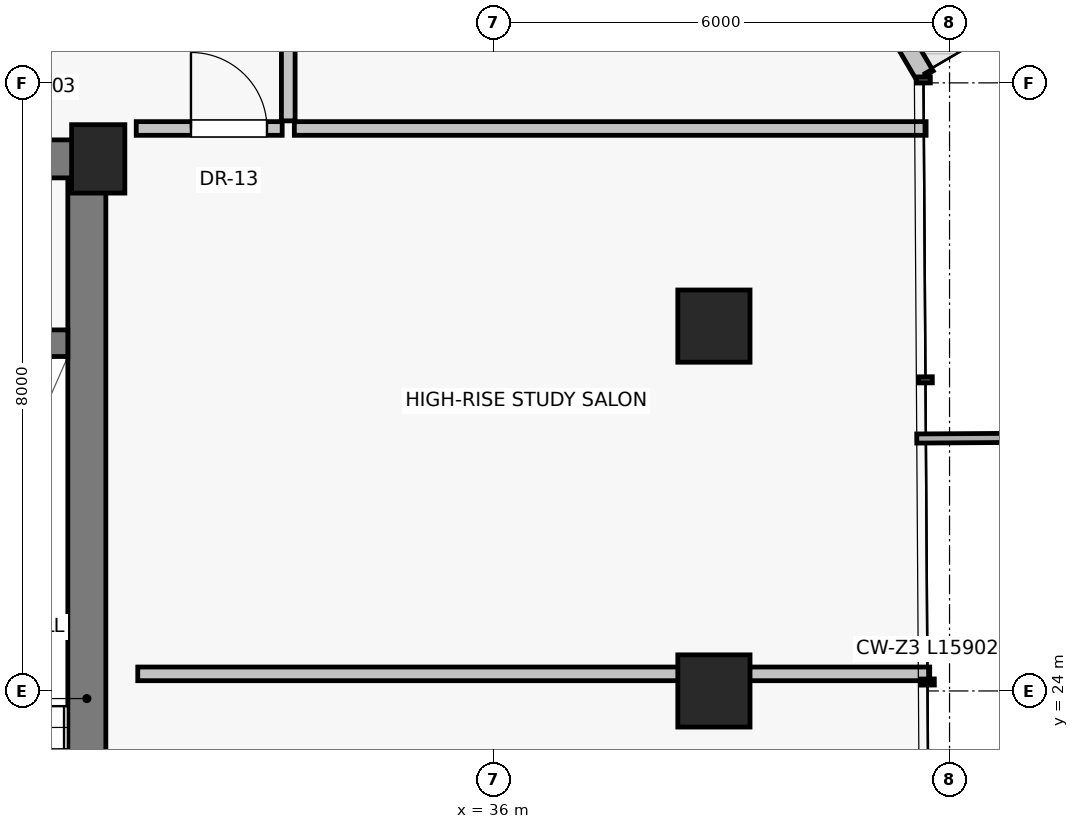
"""IFC4 building model, lengths in metres.
Left out: names, types, materials, properties, quantities, classifications, styles, units other than length and angle.
Written with IfcOpenShell. Run it as: python <this file> out.ifc"""

import sys

from ifc_helpers import new_model, si_unit, direction, frame, frame_2d, origin, origin_2d, place, context, subcontext, project, spatial, rectangle, extrude, source, transform, mapped, element, fill, save


model = new_model("IFC4")
c1 = context("Model", 3, precision=1e-05, world=origin(), true_north=direction((0.0, 1.0)))
c2 = subcontext(c1, "Body", "Model", "MODEL_VIEW")
j1 = project(units=[si_unit("LENGTHUNIT", "METRE"), si_unit("PLANEANGLEUNIT", "RADIAN")], contexts=[c1])
p1 = place(None, origin())
s1 = spatial("IfcSite", under=j1, at=p1, CompositionType="ELEMENT")
p2 = place(p1, origin())
s2 = spatial("IfcBuilding", under=s1, at=p2, CompositionType="ELEMENT")
p3 = place(p2, frame((0.0, 0.0, 204.85)))
s3 = spatial("IfcBuildingStorey", under=s2, at=p3, CompositionType="ELEMENT", Elevation=204.85)
p4 = place(p3, frame((30.8, 31.0, 0.0), z_axis=(0.0, 0.0, 1.0), x_axis=(1.0, 0.0, 0.0)))
e1 = element("IfcColumn", 1, at=p4, inside=s3, PredefinedType="PILASTER", context=c2, shape_type="SweptSolid", body=[
    extrude(rectangle(XDim=0.7, YDim=0.9, at=origin_2d()), origin(), (0.0, 0.0, 1.0), 3.25),
])
for number, where, z_axis, x_axis in (
    (2, (38.9, 24.0, 0.0), (0.0, 0.0, 1.0), (1.0, 0.0, 0.0)),
    (3, (38.9, 28.8, 0.0), (0.0, 0.0, 1.0), (1.0, 0.0, 0.0)),
):
    element("IfcColumn", number, at=place(p3, frame(where, z_axis=z_axis, x_axis=x_axis)), inside=s3, PredefinedType="COLUMN", context=c2, shape_type="SweptSolid", body=[
        extrude(rectangle(XDim=0.95, YDim=0.95, at=origin_2d()), origin(), (0.0, 0.0, 1.0), 3.25),
    ])
p5 = place(p3, frame((41.677, 32.094, 0.0), z_axis=(0.0, 0.0, 1.0), x_axis=(-0.505746709818, 0.86268201877, 0.0)))
e4 = element("IfcWall", 4, at=p5, inside=s3, PredefinedType="SOLIDWALL", context=c2, shape_type="SweptSolid", body=[
    extrude(rectangle(XDim=3.915, YDim=0.25, at=frame_2d((1.957, 0.0))), origin(), (0.0, 0.0, 1.0), 3.015),
])
p6 = place(p5, frame((2.26, 0.0, 0.0)))
e5 = element("IfcOpeningElement", 5, at=p6, cuts=e4, PredefinedType="OPENING", context=c2, shape_type="SweptSolid", body=[
    extrude(rectangle(XDim=1.15, YDim=2.25, at=frame_2d((0.575, 1.125))), frame((0.0, 0.135, 0.0), z_axis=(0.0, -1.0, 0.0), x_axis=(1.0, 0.0, 0.0)), (0.0, 0.0, 1.0), 0.27),
])
p7 = place(p3, frame((30.65, 16.8, 0.0), z_axis=(0.0, 0.0, 1.0), x_axis=(0.0, 1.0, 0.0)))
e6 = element("IfcWall", 6, at=p7, inside=s3, PredefinedType="SHEAR", context=c2, shape_type="SweptSolid", body=[
    extrude(rectangle(XDim=14.2, YDim=0.5, at=frame_2d((7.1, 0.0))), origin(), (0.0, 0.0, 1.0), 3.015),
])
p8 = place(p3, frame((27.0, 31.0, 0.0), z_axis=(0.0, 0.0, 1.0), x_axis=(1.0, 0.0, 0.0)))
e7 = element("IfcWall", 7, at=p8, inside=s3, PredefinedType="SHEAR", context=c2, shape_type="SweptSolid", body=[
    extrude(rectangle(XDim=3.8, YDim=0.5, at=frame_2d((1.9, 0.0))), origin(), (0.0, 0.0, 1.0), 3.015),
])
p9 = place(p8, frame((1.15, 0.0, 0.0)))
e8 = element("IfcOpeningElement", 8, at=p9, cuts=e7, PredefinedType="OPENING", context=c2, shape_type="SweptSolid", body=[
    extrude(rectangle(XDim=1.0, YDim=2.01, at=frame_2d((0.5, 1.005))), frame((0.0, 0.26, 0.0), z_axis=(0.0, -1.0, 0.0), x_axis=(1.0, 0.0, 0.0)), (0.0, 0.0, 1.0), 0.52),
])
p10 = place(p3, frame((27.025, 28.575, 0.0), z_axis=(0.0, 0.0, 1.0), x_axis=(1.0, 0.0, 0.0)))
e9 = element("IfcWall", 9, at=p10, inside=s3, PredefinedType="SHEAR", context=c2, shape_type="SweptSolid", body=[
    extrude(rectangle(XDim=3.375, YDim=0.35, at=frame_2d((1.688, 0.0))), origin(), (0.0, 0.0, 1.0), 3.015),
])
p11 = place(p3, frame((31.32, 24.225, 0.0), z_axis=(0.0, 0.0, 1.0), x_axis=(1.0, 0.0, 0.0)))
e10 = element("IfcWall", 10, at=p11, inside=s3, PredefinedType="PARTITIONING", context=c2, shape_type="SweptSolid", body=[
    extrude(rectangle(XDim=10.419, YDim=0.18, at=frame_2d((5.209, 0.0))), origin(), (0.0, 0.0, 1.0), 3.015),
])
p12 = place(p3, frame((33.3, 31.5, 0.0), z_axis=(0.0, 0.0, 1.0), x_axis=(0.0, 1.0, 0.0)))
e11 = element("IfcWall", 11, at=p12, inside=s3, PredefinedType="PARTITIONING", context=c2, shape_type="SweptSolid", body=[
    extrude(rectangle(XDim=1.9, YDim=0.18, at=frame_2d((0.95, 0.0))), origin(), (0.0, 0.0, 1.0), 3.015),
])
p13 = place(p3, frame((31.3, 31.4, 0.0), z_axis=(0.0, 0.0, 1.0), x_axis=(1.0, 0.0, 0.0)))
e12 = element("IfcWall", 12, at=p13, inside=s3, PredefinedType="PARTITIONING", context=c2, shape_type="SweptSolid", body=[
    extrude(rectangle(XDim=1.92, YDim=0.18, at=frame_2d((0.96, 0.0))), origin(), (0.0, 0.0, 1.0), 3.015),
])
p14 = place(p13, frame((0.72, 0.0, 0.0)))
e13 = element("IfcOpeningElement", 13, at=p14, cuts=e12, PredefinedType="OPENING", context=c2, shape_type="SweptSolid", body=[
    extrude(rectangle(XDim=1.0, YDim=2.01, at=frame_2d((0.5, 1.005))), frame((0.0, 0.1, 0.0), z_axis=(0.0, -1.0, 0.0), x_axis=(1.0, 0.0, 0.0)), (0.0, 0.0, 1.0), 0.2),
])
p15 = place(p3, frame((33.38, 31.4, 0.0), z_axis=(0.0, 0.0, 1.0), x_axis=(1.0, 0.0, 0.0)))
e14 = element("IfcWall", 14, at=p15, inside=s3, PredefinedType="PARTITIONING", context=c2, shape_type="SweptSolid", body=[
    extrude(rectangle(XDim=8.312, YDim=0.18, at=frame_2d((4.156, 0.0))), origin(), (0.0, 0.0, 1.0), 3.015),
])
m1 = source(origin(), c2, "Body", "SweptSolid", [
    extrude(rectangle(XDim=1.0, YDim=2.01, at=frame_2d((0.5, 1.005))), frame((0.0, 0.025, 0.0), z_axis=(0.0, -1.0, 0.0), x_axis=(1.0, 0.0, 0.0)), (0.0, 0.0, 1.0), 0.05),
])
p16 = place(p14, origin())
e15 = element("IfcDoor", 15, at=p16, inside=s3, OperationType="SINGLE_SWING_LEFT", PredefinedType="DOOR", context=c2, shape_type="MappedRepresentation", body=[
    mapped(m1, transform((0.0, 0.0, 0.0), scale=1.0)),
])
fill(e13, e15)
save(model, sys.argv[1])
